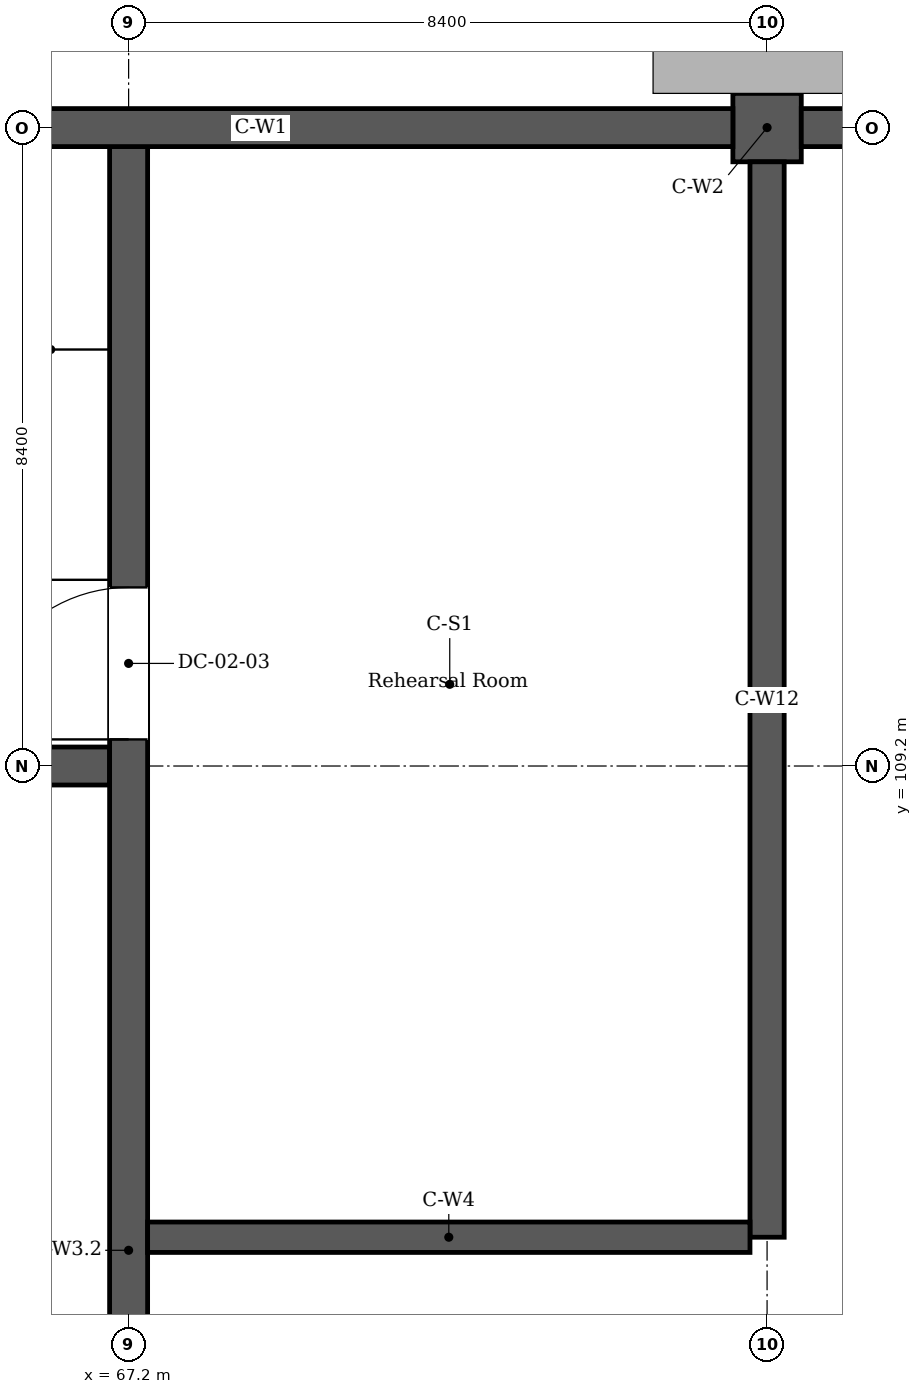
"""IFC4 building model, lengths in metres.
Left out: names, types, materials, properties, quantities, classifications, styles, units other than length and angle.
Written with IfcOpenShell. Run it as: python <this file> out.ifc"""

import sys

from ifc_helpers import new_model, si_unit, direction, frame, frame_2d, origin, place, context, subcontext, project, spatial, rectangle, extrude, element, fill, save


model = new_model("IFC4")
c1 = context("Model", 3, precision=1e-05, world=origin(), true_north=direction((0.0, 1.0)))
c2 = subcontext(c1, "Body", "Model", "MODEL_VIEW")
j1 = project(units=[si_unit("LENGTHUNIT", "METRE"), si_unit("PLANEANGLEUNIT", "RADIAN")], contexts=[c1])
p1 = place(None, origin())
s1 = spatial("IfcSite", under=j1, at=p1, CompositionType="ELEMENT")
p2 = place(p1, origin())
s2 = spatial("IfcBuilding", under=s1, at=p2, CompositionType="ELEMENT")
p3 = place(p2, frame((0.0, 0.0, 10.2)))
s3 = spatial("IfcBuildingStorey", under=s2, at=p3, CompositionType="ELEMENT", Elevation=10.2)
p4 = place(p3, frame((76.05, 117.6, 0.0), z_axis=(0.0, 0.0, 1.0), x_axis=(1.0, 0.0, 0.0)))
e1 = element("IfcWall", 1, at=p4, inside=s3, PredefinedType="SOLIDWALL", context=c2, shape_type="SweptSolid", body=[
    extrude(rectangle(XDim=7.5, YDim=0.5, at=frame_2d((3.75, 0.0))), origin(), (0.0, 0.0, 1.0), 4.2),
])
p5 = place(p3, frame((58.55, 117.6, 0.0), z_axis=(0.0, 0.0, 1.0), x_axis=(1.0, 0.0, 0.0)))
e2 = element("IfcWall", 2, at=p5, inside=s3, PredefinedType="SOLIDWALL", context=c2, shape_type="SweptSolid", body=[
    extrude(rectangle(XDim=16.6, YDim=0.5, at=frame_2d((8.3, 0.0))), origin(), (0.0, 0.0, 1.0), 4.2),
])
p6 = place(p5, frame((4.0, 0.0, 0.9)))
e3 = element("IfcOpeningElement", 3, at=p6, cuts=e2, PredefinedType="OPENING", context=c2, shape_type="SweptSolid", body=[
    extrude(rectangle(XDim=0.9, YDim=2.4, at=frame_2d((0.45, 1.2))), frame((0.0, 0.26, 0.0), z_axis=(0.0, -1.0, 0.0), x_axis=(1.0, 0.0, 0.0)), (0.0, 0.0, 1.0), 0.52),
])
p7 = place(p3, frame((76.05, 117.6, 0.0), z_axis=(0.0, 0.0, 1.0), x_axis=(-1.0, 0.0, 0.0)))
e4 = element("IfcWall", 4, at=p7, inside=s3, PredefinedType="SOLIDWALL", context=c2, shape_type="SweptSolid", body=[
    extrude(rectangle(XDim=0.9, YDim=0.9, at=frame_2d((0.45, 0.0))), origin(), (0.0, 0.0, 1.0), 4.2),
])
p8 = place(p3, frame((67.2, 75.85, 0.0), z_axis=(0.0, 0.0, 1.0), x_axis=(0.0, 1.0, 0.0)))
e5 = element("IfcWall", 5, at=p8, inside=s3, PredefinedType="SOLIDWALL", context=c2, shape_type="SweptSolid", body=[
    extrude(rectangle(XDim=41.5, YDim=0.5, at=frame_2d((20.75, 0.0))), origin(), (0.0, 0.0, 1.0), 4.2),
])
p9 = place(p8, frame((33.7, 0.0, 0.0)))
e6 = element("IfcOpeningElement", 6, at=p9, cuts=e5, PredefinedType="OPENING", context=c2, shape_type="SweptSolid", body=[
    extrude(rectangle(XDim=2.0, YDim=2.1, at=frame_2d((1.0, 1.05))), frame((0.0, 0.26, 0.0), z_axis=(0.0, -1.0, 0.0), x_axis=(1.0, 0.0, 0.0)), (0.0, 0.0, 1.0), 0.52),
])
p10 = place(p3, frame((75.6, 103.0, 0.0), z_axis=(0.0, 0.0, 1.0), x_axis=(0.0, 1.0, 0.0)))
e7 = element("IfcWall", 7, at=p10, inside=s3, PredefinedType="SOLIDWALL", context=c2, shape_type="SweptSolid", body=[
    extrude(rectangle(XDim=14.15, YDim=0.45, at=frame_2d((7.075, 0.0))), origin(), (0.0, 0.0, 1.0), 4.2),
])
p11 = place(p3, frame((67.45, 103.0, 0.0), z_axis=(0.0, 0.0, 1.0), x_axis=(1.0, 0.0, 0.0)))
e8 = element("IfcWall", 8, at=p11, inside=s3, PredefinedType="SOLIDWALL", context=c2, shape_type="SweptSolid", body=[
    extrude(rectangle(XDim=7.925, YDim=0.4, at=frame_2d((3.962, 0.0))), origin(), (0.0, 0.0, 1.0), 4.2),
])
p12 = place(p3, frame((59.05, 109.2, 0.0), z_axis=(0.0, 0.0, 1.0), x_axis=(1.0, 0.0, 0.0)))
e9 = element("IfcWall", 9, at=p12, inside=s3, PredefinedType="SOLIDWALL", context=c2, shape_type="SweptSolid", body=[
    extrude(rectangle(XDim=7.9, YDim=0.5, at=frame_2d((3.95, 0.0))), origin(), (0.0, 0.0, 1.0), 4.2),
])
p13 = place(p9, origin())
e10 = element("IfcDoor", 10, at=p13, inside=s3, OperationType="DOUBLE_DOOR_DOUBLE_SWING", PredefinedType="DOOR", context=c2, shape_type="SweptSolid", body=[
    extrude(rectangle(XDim=2.0, YDim=2.1, at=frame_2d((1.0, 1.05))), frame((0.0, 0.025, 0.0), z_axis=(0.0, -1.0, 0.0), x_axis=(1.0, 0.0, 0.0)), (0.0, 0.0, 1.0), 0.05),
])
fill(e6, e10)
save(model, sys.argv[1])
